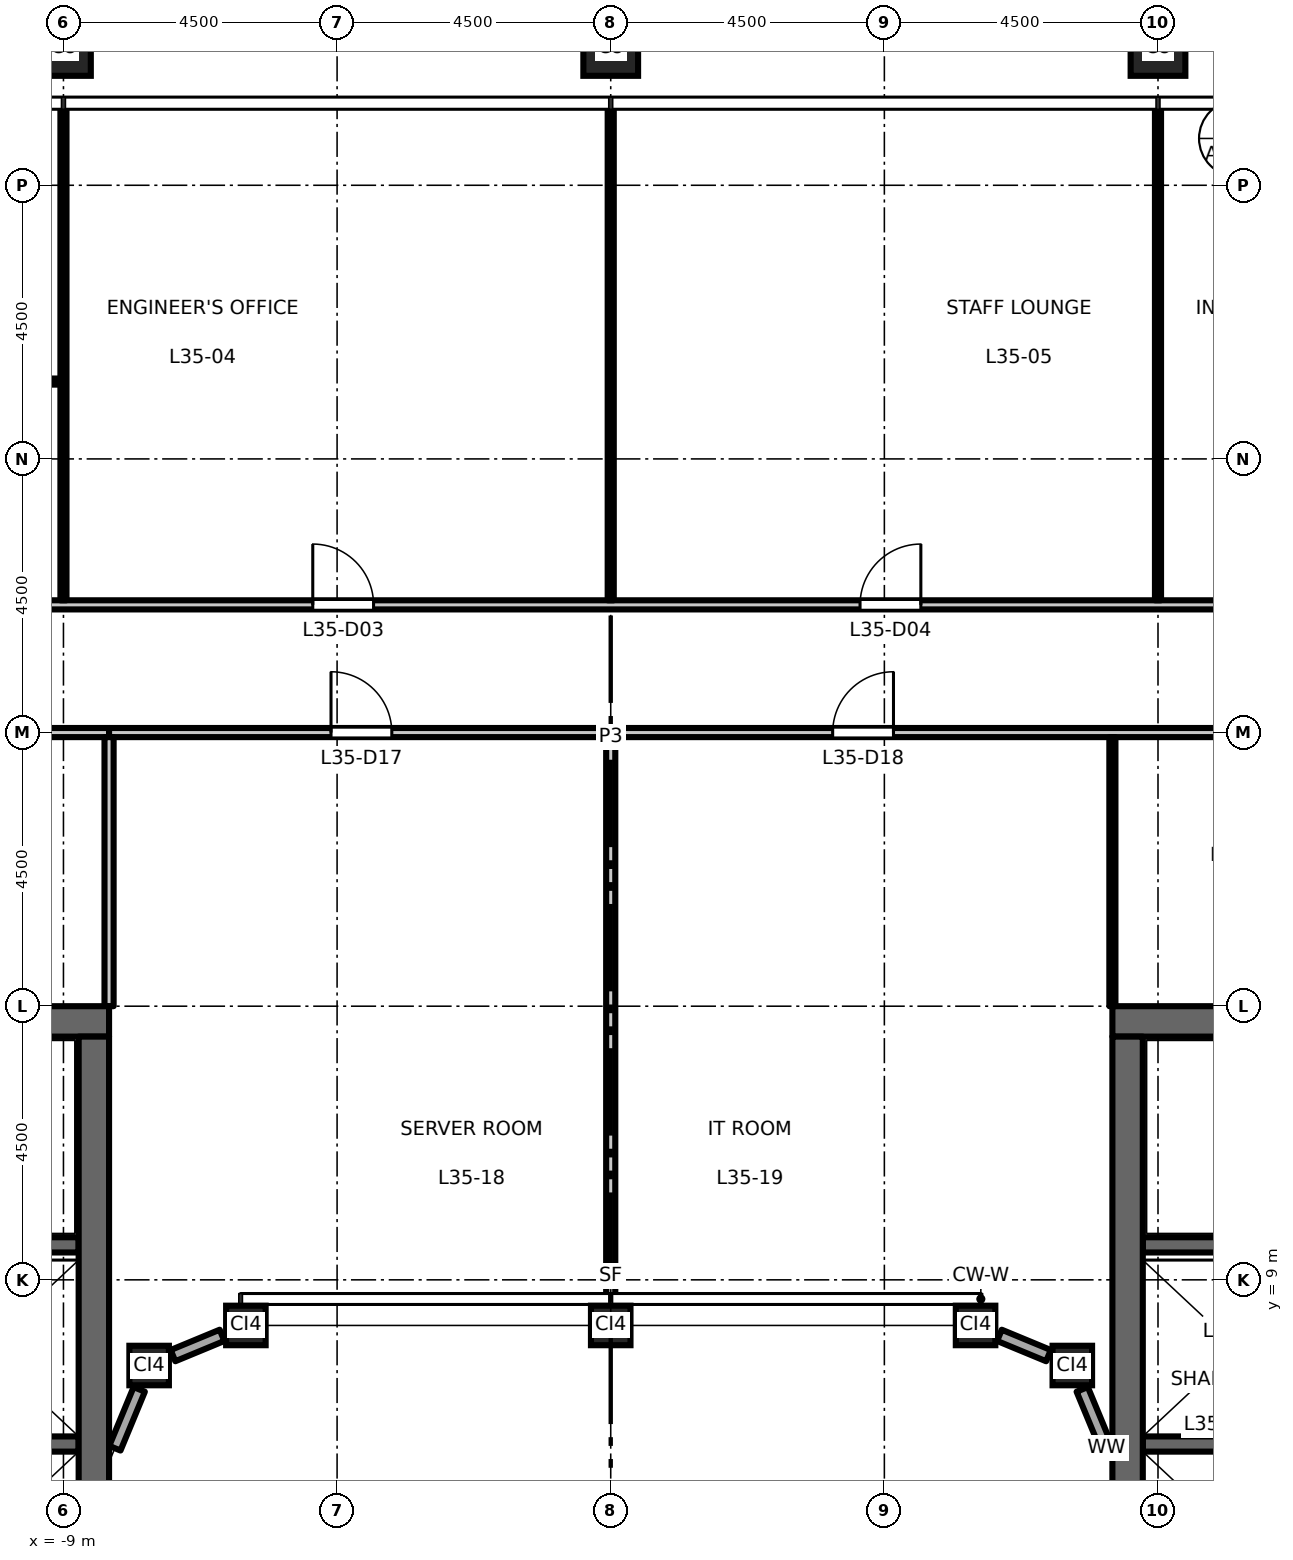
"""IFC4 building model, lengths in metres.
Left out: names, types, materials, properties, quantities, classifications, styles, units other than length and angle.
Written with IfcOpenShell. Run it as: python <this file> out.ifc"""

import sys

from ifc_helpers import new_model, si_unit, direction, frame, frame_2d, origin, origin_2d, place, context, subcontext, project, spatial, rectangle, hollow_rectangle, extrude, element, fill, save


model = new_model("IFC4")
c1 = context("Model", 3, precision=1e-05, world=origin(), true_north=direction((0.0, 1.0)))
c2 = subcontext(c1, "Body", "Model", "MODEL_VIEW")
j1 = project(units=[si_unit("LENGTHUNIT", "METRE"), si_unit("PLANEANGLEUNIT", "RADIAN")], contexts=[c1])
p1 = place(None, origin())
s1 = spatial("IfcSite", under=j1, at=p1, CompositionType="ELEMENT")
p2 = place(p1, origin())
s2 = spatial("IfcBuilding", under=s1, at=p2, CompositionType="ELEMENT")
p3 = place(p2, frame((0.0, 0.0, 163.2)))
s3 = spatial("IfcBuildingStorey", under=s2, at=p3, CompositionType="ELEMENT", Elevation=163.2)
for number, where, z_axis, x_axis in (
    (1, (9.0, 29.25, 0.0), (0.0, 0.0, 1.0), (1.0, 0.0, 0.0)),
    (2, (0.0, 29.25, 0.0), (0.0, 0.0, 1.0), (1.0, 0.0, 0.0)),
    (3, (-9.0, 29.25, 0.0), (0.0, 0.0, 1.0), (1.0, 0.0, 0.0)),
):
    element("IfcColumn", number, at=place(p3, frame(where, z_axis=z_axis, x_axis=x_axis)), inside=s3, PredefinedType="COLUMN", context=c2, shape_type="SweptSolid", body=[
        extrude(hollow_rectangle(XDim=0.9, YDim=0.9, WallThickness=0.05, at=origin_2d()), origin(), (0.0, 0.0, 1.0), 4.5),
    ])
for number, where, z_axis, x_axis in (
    (4, (-7.591, 7.591, 0.0), (0.0, 0.0, 1.0), (1.0, 0.0, 0.0)),
    (5, (-6.0, 8.25, 0.0), (0.0, 0.0, 1.0), (1.0, 0.0, 0.0)),
    (6, (0.0, 8.25, 0.0), (0.0, 0.0, 1.0), (1.0, 0.0, 0.0)),
    (7, (6.0, 8.25, 0.0), (0.0, 0.0, 1.0), (1.0, 0.0, 0.0)),
    (8, (7.591, 7.591, 0.0), (0.0, 0.0, 1.0), (1.0, 0.0, 0.0)),
):
    element("IfcColumn", number, at=place(p3, frame(where, z_axis=z_axis, x_axis=x_axis)), inside=s3, PredefinedType="COLUMN", context=c2, shape_type="SweptSolid", body=[
        extrude(hollow_rectangle(XDim=0.65, YDim=0.65, WallThickness=0.036, at=origin_2d()), origin(), (0.0, 0.0, 1.0), 4.5),
    ])
p4 = place(p3, frame((-8.75, 6.3, 0.0), z_axis=(0.0, 0.0, 1.0), x_axis=(-1.0, 0.0, 0.0)))
e9 = element("IfcWall", 9, at=p4, inside=s3, PredefinedType="SHEAR", context=c2, shape_type="SweptSolid", body=[
    extrude(rectangle(XDim=3.1, YDim=0.25, at=frame_2d((1.55, 0.0))), origin(), (0.0, 0.0, 1.0), 4.35),
])
p5 = place(p3, frame((-8.75, 9.575, 0.0), z_axis=(0.0, 0.0, 1.0), x_axis=(-1.0, 0.0, 0.0)))
e10 = element("IfcWall", 10, at=p5, inside=s3, PredefinedType="SHEAR", context=c2, shape_type="SweptSolid", body=[
    extrude(rectangle(XDim=8.0, YDim=0.25, at=frame_2d((4.0, 0.0))), origin(), (0.0, 0.0, 1.0), 4.35),
])
p6 = place(p5, frame((6.65, 0.0, 0.0)))
e11 = element("IfcOpeningElement", 11, at=p6, cuts=e10, PredefinedType="OPENING", context=c2, shape_type="SweptSolid", body=[
    extrude(rectangle(XDim=1.1, YDim=2.1, at=frame_2d((0.55, 1.05))), frame((0.0, 0.135, 0.0), z_axis=(0.0, -1.0, 0.0), x_axis=(1.0, 0.0, 0.0)), (0.0, 0.0, 1.0), 0.27),
])
p7 = place(p3, frame((-8.25, 13.25, 0.0), z_axis=(0.0, 0.0, 1.0), x_axis=(-1.0, 0.0, 0.0)))
e12 = element("IfcWall", 12, at=p7, inside=s3, PredefinedType="SHEAR", context=c2, shape_type="SweptSolid", body=[
    extrude(rectangle(XDim=13.5, YDim=0.5, at=frame_2d((6.75, 0.0))), origin(), (0.0, 0.0, 1.0), 4.35),
])
p8 = place(p3, frame((-8.5, -13.0, 0.0), z_axis=(0.0, 0.0, 1.0), x_axis=(0.0, 1.0, 0.0)))
e13 = element("IfcWall", 13, at=p8, inside=s3, PredefinedType="SHEAR", context=c2, shape_type="SweptSolid", body=[
    extrude(rectangle(XDim=26.0, YDim=0.5, at=frame_2d((13.0, 0.0))), origin(), (0.0, 0.0, 1.0), 4.35),
])
p9 = place(p3, frame((8.75, 6.3, 0.0), z_axis=(0.0, 0.0, 1.0), x_axis=(1.0, 0.0, 0.0)))
e14 = element("IfcWall", 14, at=p9, inside=s3, PredefinedType="SHEAR", context=c2, shape_type="SweptSolid", body=[
    extrude(rectangle(XDim=3.1, YDim=0.25, at=frame_2d((1.55, 0.0))), origin(), (0.0, 0.0, 1.0), 4.35),
])
p10 = place(p3, frame((8.75, 9.575, 0.0), z_axis=(0.0, 0.0, 1.0), x_axis=(1.0, 0.0, 0.0)))
e15 = element("IfcWall", 15, at=p10, inside=s3, PredefinedType="SHEAR", context=c2, shape_type="SweptSolid", body=[
    extrude(rectangle(XDim=8.0, YDim=0.25, at=frame_2d((4.0, 0.0))), origin(), (0.0, 0.0, 1.0), 4.35),
])
p11 = place(p10, frame((6.65, 0.0, 0.0)))
e16 = element("IfcOpeningElement", 16, at=p11, cuts=e15, PredefinedType="OPENING", context=c2, shape_type="SweptSolid", body=[
    extrude(rectangle(XDim=1.1, YDim=2.1, at=frame_2d((0.55, 1.05))), frame((0.0, 0.135, 0.0), z_axis=(0.0, -1.0, 0.0), x_axis=(1.0, 0.0, 0.0)), (0.0, 0.0, 1.0), 0.27),
])
p12 = place(p3, frame((8.25, 13.25, 0.0), z_axis=(0.0, 0.0, 1.0), x_axis=(1.0, 0.0, 0.0)))
e17 = element("IfcWall", 17, at=p12, inside=s3, PredefinedType="SHEAR", context=c2, shape_type="SweptSolid", body=[
    extrude(rectangle(XDim=13.5, YDim=0.5, at=frame_2d((6.75, 0.0))), origin(), (0.0, 0.0, 1.0), 4.35),
])
p13 = place(p3, frame((8.5, -13.0, 0.0), z_axis=(0.0, 0.0, 1.0), x_axis=(0.0, 1.0, 0.0)))
e18 = element("IfcWall", 18, at=p13, inside=s3, PredefinedType="SHEAR", context=c2, shape_type="SweptSolid", body=[
    extrude(rectangle(XDim=26.0, YDim=0.5, at=frame_2d((13.0, 0.0))), origin(), (0.0, 0.0, 1.0), 4.35),
])
p14 = place(p3, frame((8.154, 6.231, 0.0), z_axis=(0.0, 0.0, 1.0), x_axis=(-0.382694858887, 0.923874799408, 0.0)))
e19 = element("IfcWall", 19, at=p14, inside=s3, PredefinedType="STANDARD", context=c2, shape_type="SweptSolid", body=[
    extrude(rectangle(XDim=1.048, YDim=0.2, at=frame_2d((0.524, 0.0))), origin(), (0.0, 0.0, 1.0), 3.826),
])
for number, where, z_axis, x_axis in (
    (20, (7.199, 7.753, 0.0), (0.0, 0.0, 1.0), (-0.924, 0.383, 0.0)),
    (21, (-6.392, 8.087, 0.0), (0.0, 0.0, 1.0), (-0.924, -0.383, 0.0)),
):
    element("IfcWall", number, at=place(p3, frame(where, z_axis=z_axis, x_axis=x_axis)), inside=s3, PredefinedType="STANDARD", context=c2, shape_type="SweptSolid", body=[
        extrude(rectangle(XDim=0.873, YDim=0.2, at=frame_2d((0.437, 0.0))), origin(), (0.0, 0.0, 1.0), 3.826),
    ])
p15 = place(p3, frame((-7.753, 7.199, 0.0), z_axis=(0.0, 0.0, 1.0), x_axis=(-0.382694858887, -0.923874799408, 0.0)))
e22 = element("IfcWall", 22, at=p15, inside=s3, PredefinedType="STANDARD", context=c2, shape_type="SweptSolid", body=[
    extrude(rectangle(XDim=1.048, YDim=0.2, at=frame_2d((0.524, 0.0))), origin(), (0.0, 0.0, 1.0), 3.826),
])
p16 = place(p3, frame((-21.825, 18.0, 0.0), z_axis=(0.0, 0.0, 1.0), x_axis=(1.0, 0.0, 0.0)))
e23 = element("IfcWall", 23, at=p16, inside=s3, PredefinedType="PARTITIONING", context=c2, shape_type="SweptSolid", body=[
    extrude(rectangle(XDim=13.575, YDim=0.15, at=frame_2d((6.788, 0.0))), origin(), (0.0, 0.0, 1.0), 4.35),
])
p17 = place(p16, frame((6.225, 0.0, 0.0)))
e24 = element("IfcOpeningElement", 24, at=p17, cuts=e23, PredefinedType="OPENING", context=c2, shape_type="SweptSolid", body=[
    extrude(rectangle(XDim=1.0, YDim=2.1, at=frame_2d((0.5, 1.05))), frame((0.0, 0.085, 0.0), z_axis=(0.0, -1.0, 0.0), x_axis=(1.0, 0.0, 0.0)), (0.0, 0.0, 1.0), 0.17),
])
p18 = place(p3, frame((0.0, 18.0, 0.0), z_axis=(0.0, 0.0, 1.0), x_axis=(1.0, 0.0, 0.0)))
e25 = element("IfcWall", 25, at=p18, inside=s3, PredefinedType="PARTITIONING", context=c2, shape_type="SweptSolid", body=[
    extrude(rectangle(XDim=21.825, YDim=0.15, at=frame_2d((10.913, 0.0))), origin(), (0.0, 0.0, 1.0), 4.35),
])
p19 = place(p18, frame((3.65, 0.0, 0.0)))
e26 = element("IfcOpeningElement", 26, at=p19, cuts=e25, PredefinedType="OPENING", context=c2, shape_type="SweptSolid", body=[
    extrude(rectangle(XDim=1.0, YDim=2.1, at=frame_2d((0.5, 1.05))), frame((0.0, 0.085, 0.0), z_axis=(0.0, -1.0, 0.0), x_axis=(1.0, 0.0, 0.0)), (0.0, 0.0, 1.0), 0.17),
])
p20 = place(p18, frame((14.4, 0.0, 0.0)))
e27 = element("IfcOpeningElement", 27, at=p20, cuts=e25, PredefinedType="OPENING", context=c2, shape_type="SweptSolid", body=[
    extrude(rectangle(XDim=1.0, YDim=2.1, at=frame_2d((0.5, 1.05))), frame((0.0, 0.085, 0.0), z_axis=(0.0, -1.0, 0.0), x_axis=(1.0, 0.0, 0.0)), (0.0, 0.0, 1.0), 0.17),
])
p21 = place(p3, frame((-8.25, 18.0, 0.0), z_axis=(0.0, 0.0, 1.0), x_axis=(1.0, 0.0, 0.0)))
e28 = element("IfcWall", 28, at=p21, inside=s3, PredefinedType="PARTITIONING", context=c2, shape_type="SweptSolid", body=[
    extrude(rectangle(XDim=8.25, YDim=0.15, at=frame_2d((4.125, 0.0))), origin(), (0.0, 0.0, 1.0), 4.35),
])
p22 = place(p21, frame((3.65, 0.0, 0.0)))
e29 = element("IfcOpeningElement", 29, at=p22, cuts=e28, PredefinedType="OPENING", context=c2, shape_type="SweptSolid", body=[
    extrude(rectangle(XDim=1.0, YDim=2.1, at=frame_2d((0.5, 1.05))), frame((0.0, 0.085, 0.0), z_axis=(0.0, -1.0, 0.0), x_axis=(1.0, 0.0, 0.0)), (0.0, 0.0, 1.0), 0.17),
])
p23 = place(p3, frame((-27.308, 20.1, 0.0), z_axis=(0.0, 0.0, 1.0), x_axis=(1.0, 0.0, 0.0)))
e30 = element("IfcWall", 30, at=p23, inside=s3, PredefinedType="PARTITIONING", context=c2, shape_type="SweptSolid", body=[
    extrude(rectangle(XDim=54.616, YDim=0.15, at=frame_2d((27.308, 0.0))), origin(), (0.0, 0.0, 1.0), 4.35),
])
p24 = place(p23, frame((13.408, 0.0, 0.0)))
e31 = element("IfcOpeningElement", 31, at=p24, cuts=e30, PredefinedType="OPENING", context=c2, shape_type="SweptSolid", body=[
    extrude(rectangle(XDim=1.0, YDim=2.1, at=frame_2d((0.5, 1.05))), frame((0.0, 0.085, 0.0), z_axis=(0.0, -1.0, 0.0), x_axis=(1.0, 0.0, 0.0)), (0.0, 0.0, 1.0), 0.17),
])
p25 = place(p23, frame((22.408, 0.0, 0.0)))
e32 = element("IfcOpeningElement", 32, at=p25, cuts=e30, PredefinedType="OPENING", context=c2, shape_type="SweptSolid", body=[
    extrude(rectangle(XDim=1.0, YDim=2.1, at=frame_2d((0.5, 1.05))), frame((0.0, 0.085, 0.0), z_axis=(0.0, -1.0, 0.0), x_axis=(1.0, 0.0, 0.0)), (0.0, 0.0, 1.0), 0.17),
])
p26 = place(p23, frame((31.408, 0.0, 0.0)))
e33 = element("IfcOpeningElement", 33, at=p26, cuts=e30, PredefinedType="OPENING", context=c2, shape_type="SweptSolid", body=[
    extrude(rectangle(XDim=1.0, YDim=2.1, at=frame_2d((0.5, 1.05))), frame((0.0, 0.085, 0.0), z_axis=(0.0, -1.0, 0.0), x_axis=(1.0, 0.0, 0.0)), (0.0, 0.0, 1.0), 0.17),
])
p27 = place(p23, frame((40.408, 0.0, 0.0)))
e34 = element("IfcOpeningElement", 34, at=p27, cuts=e30, PredefinedType="OPENING", context=c2, shape_type="SweptSolid", body=[
    extrude(rectangle(XDim=1.0, YDim=2.1, at=frame_2d((0.5, 1.05))), frame((0.0, 0.085, 0.0), z_axis=(0.0, -1.0, 0.0), x_axis=(1.0, 0.0, 0.0)), (0.0, 0.0, 1.0), 0.17),
])
p28 = place(p23, frame((4.158, 0.0, 0.0)))
e35 = element("IfcOpeningElement", 35, at=p28, cuts=e30, PredefinedType="OPENING", context=c2, shape_type="SweptSolid", body=[
    extrude(rectangle(XDim=1.0, YDim=2.1, at=frame_2d((0.5, 1.05))), frame((0.0, 0.085, 0.0), z_axis=(0.0, -1.0, 0.0), x_axis=(1.0, 0.0, 0.0)), (0.0, 0.0, 1.0), 0.17),
])
p29 = place(p23, frame((49.466, 0.0, 0.0)))
e36 = element("IfcOpeningElement", 36, at=p29, cuts=e30, PredefinedType="OPENING", context=c2, shape_type="SweptSolid", body=[
    extrude(rectangle(XDim=1.0, YDim=2.1, at=frame_2d((0.5, 1.05))), frame((0.0, 0.085, 0.0), z_axis=(0.0, -1.0, 0.0), x_axis=(1.0, 0.0, 0.0)), (0.0, 0.0, 1.0), 0.17),
])
p30 = place(p3, frame((-17.95, 23.772, 0.0), z_axis=(0.0, 0.0, 1.0), x_axis=(1.0, 0.0, 0.0)))
e37 = element("IfcWall", 37, at=p30, inside=s3, PredefinedType="PARTITIONING", context=c2, shape_type="SweptSolid", body=[
    extrude(rectangle(XDim=8.9, YDim=0.1, at=frame_2d((4.45, 0.0))), origin(), (0.0, 0.0, 1.0), 4.35),
])
p31 = place(p30, frame((4.05, 0.0, 0.0)))
e38 = element("IfcOpeningElement", 38, at=p31, cuts=e37, PredefinedType="OPENING", context=c2, shape_type="SweptSolid", body=[
    extrude(rectangle(XDim=1.0, YDim=2.1, at=frame_2d((0.5, 1.05))), frame((0.0, 0.06, 0.0), z_axis=(0.0, -1.0, 0.0), x_axis=(1.0, 0.0, 0.0)), (0.0, 0.0, 1.0), 0.12),
])
p32 = place(p3, frame((-9.0, 20.175, 0.0), z_axis=(0.0, 0.0, 1.0), x_axis=(0.0, 1.0, 0.0)))
e39 = element("IfcWall", 39, at=p32, inside=s3, PredefinedType="PARTITIONING", context=c2, shape_type="SweptSolid", body=[
    extrude(rectangle(XDim=8.085, YDim=0.1, at=frame_2d((4.042, 0.0))), origin(), (0.0, 0.0, 1.0), 3.45),
])
p33 = place(p3, frame((-8.25, 13.5, 0.0), z_axis=(0.0, 0.0, 1.0), x_axis=(0.0, 1.0, 0.0)))
e40 = element("IfcWall", 40, at=p33, inside=s3, PredefinedType="PARTITIONING", context=c2, shape_type="SweptSolid", body=[
    extrude(rectangle(XDim=4.425, YDim=0.15, at=frame_2d((2.212, 0.0))), origin(), (0.0, 0.0, 1.0), 4.35),
])
p34 = place(p3, frame((0.0, 20.175, 0.0), z_axis=(0.0, 0.0, 1.0), x_axis=(0.0, 1.0, 0.0)))
e41 = element("IfcWall", 41, at=p34, inside=s3, PredefinedType="PARTITIONING", context=c2, shape_type="SweptSolid", body=[
    extrude(rectangle(XDim=8.085, YDim=0.1, at=frame_2d((4.042, 0.0))), origin(), (0.0, 0.0, 1.0), 3.45),
])
p35 = place(p3, frame((0.0, 8.65, 0.0), z_axis=(0.0, 0.0, 1.0), x_axis=(0.0, 1.0, 0.0)))
e42 = element("IfcWall", 42, at=p35, inside=s3, PredefinedType="PARTITIONING", context=c2, shape_type="SweptSolid", body=[
    extrude(rectangle(XDim=9.275, YDim=0.15, at=frame_2d((4.638, 0.0))), origin(), (0.0, 0.0, 1.0), 3.45),
])
p36 = place(p3, frame((8.25, 13.5, 0.0), z_axis=(0.0, 0.0, 1.0), x_axis=(0.0, 1.0, 0.0)))
e43 = element("IfcWall", 43, at=p36, inside=s3, PredefinedType="PARTITIONING", context=c2, shape_type="SweptSolid", body=[
    extrude(rectangle(XDim=4.425, YDim=0.1, at=frame_2d((2.212, 0.0))), origin(), (0.0, 0.0, 1.0), 4.35),
])
p37 = place(p3, frame((9.0, 20.175, 0.0), z_axis=(0.0, 0.0, 1.0), x_axis=(0.0, 1.0, 0.0)))
e44 = element("IfcWall", 44, at=p37, inside=s3, PredefinedType="PARTITIONING", context=c2, shape_type="SweptSolid", body=[
    extrude(rectangle(XDim=8.085, YDim=0.1, at=frame_2d((4.042, 0.0))), origin(), (0.0, 0.0, 1.0), 3.45),
])
p38 = place(p25, origin())
e45 = element("IfcDoor", 45, at=p38, inside=s3, OperationType="SINGLE_SWING_LEFT", PredefinedType="DOOR", context=c2, shape_type="SweptSolid", body=[
    extrude(rectangle(XDim=1.0, YDim=2.1, at=frame_2d((0.5, 1.05))), frame((0.0, 0.025, 0.0), z_axis=(0.0, -1.0, 0.0), x_axis=(1.0, 0.0, 0.0)), (0.0, 0.0, 1.0), 0.05),
])
fill(e32, e45)
p39 = place(p26, origin())
e46 = element("IfcDoor", 46, at=p39, inside=s3, OperationType="SINGLE_SWING_RIGHT", PredefinedType="DOOR", context=c2, shape_type="SweptSolid", body=[
    extrude(rectangle(XDim=1.0, YDim=2.1, at=frame_2d((0.5, 1.05))), frame((0.0, 0.025, 0.0), z_axis=(0.0, -1.0, 0.0), x_axis=(1.0, 0.0, 0.0)), (0.0, 0.0, 1.0), 0.05),
])
fill(e33, e46)
p40 = place(p22, origin())
e47 = element("IfcDoor", 47, at=p40, inside=s3, OperationType="SINGLE_SWING_LEFT", PredefinedType="DOOR", context=c2, shape_type="SweptSolid", body=[
    extrude(rectangle(XDim=1.0, YDim=2.1, at=frame_2d((0.5, 1.05))), frame((0.0, 0.025, 0.0), z_axis=(0.0, -1.0, 0.0), x_axis=(1.0, 0.0, 0.0)), (0.0, 0.0, 1.0), 0.05),
])
fill(e29, e47)
p41 = place(p19, origin())
e48 = element("IfcDoor", 48, at=p41, inside=s3, OperationType="SINGLE_SWING_RIGHT", PredefinedType="DOOR", context=c2, shape_type="SweptSolid", body=[
    extrude(rectangle(XDim=1.0, YDim=2.1, at=frame_2d((0.5, 1.05))), frame((0.0, 0.025, 0.0), z_axis=(0.0, -1.0, 0.0), x_axis=(1.0, 0.0, 0.0)), (0.0, 0.0, 1.0), 0.05),
])
fill(e26, e48)
save(model, sys.argv[1])
